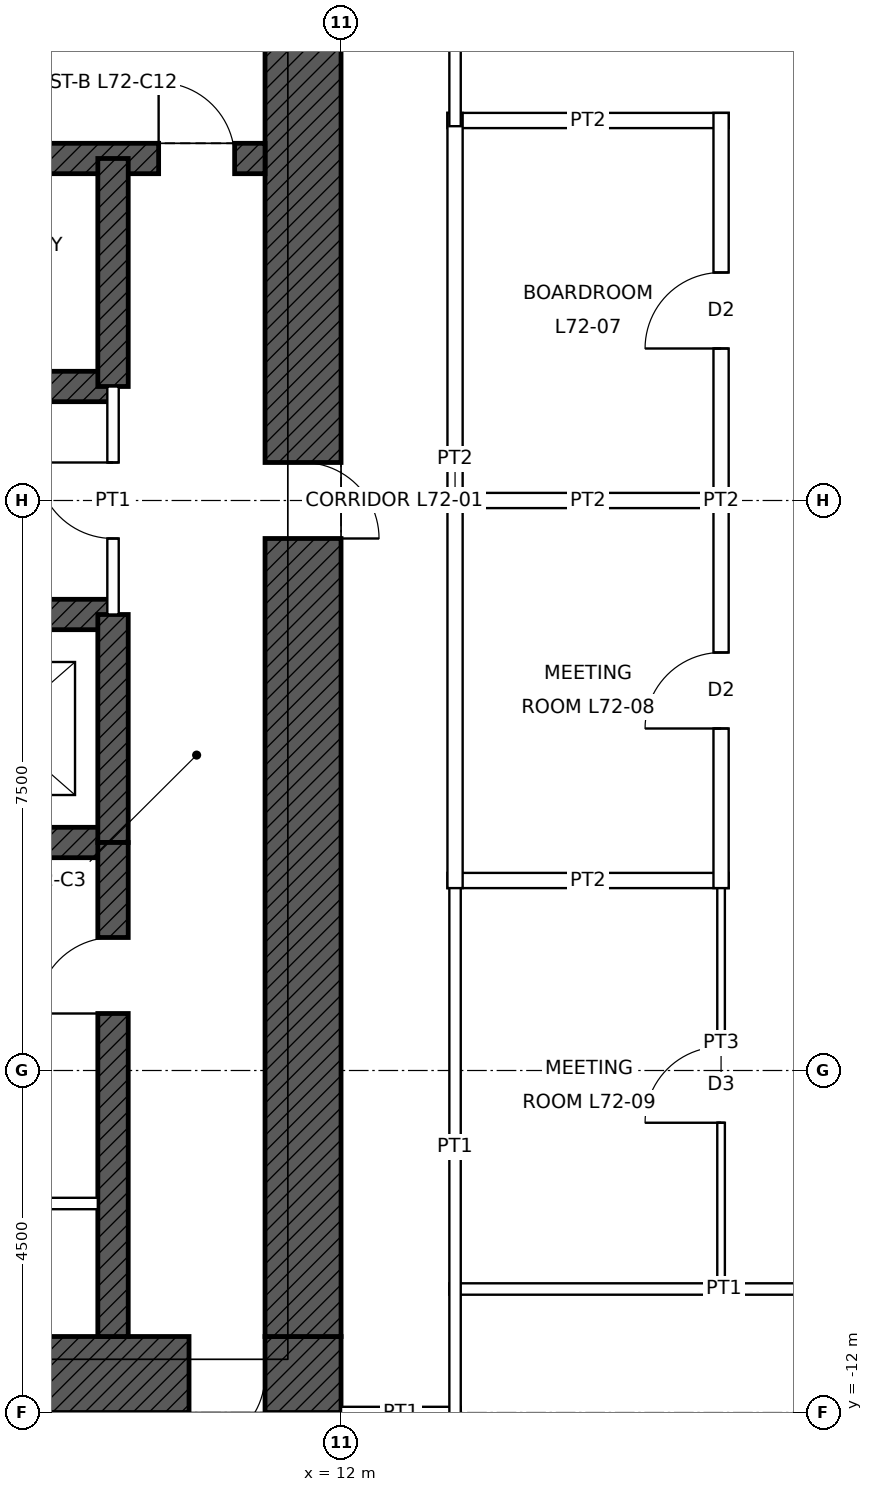
"""IFC4 building model, lengths in metres.
Left out: names, types, materials, properties, quantities, classifications, styles, units other than length and angle.
Written with IfcOpenShell. Run it as: python <this file> out.ifc"""

import sys

from ifc_helpers import new_model, si_unit, direction, frame, frame_2d, origin, place, context, subcontext, project, spatial, rectangle, extrude, element, fill, save


model = new_model("IFC4")
c1 = context("Model", 3, precision=1e-05, world=origin(), true_north=direction((0.0, 1.0)))
c2 = subcontext(c1, "Body", "Model", "MODEL_VIEW")
j1 = project(units=[si_unit("LENGTHUNIT", "METRE"), si_unit("PLANEANGLEUNIT", "RADIAN")], contexts=[c1])
p1 = place(None, origin())
s1 = spatial("IfcSite", under=j1, at=p1, CompositionType="ELEMENT")
p2 = place(p1, origin())
s2 = spatial("IfcBuilding", under=s1, at=p2, CompositionType="ELEMENT")
p3 = place(p2, frame((0.0, 0.0, 323.9)))
s3 = spatial("IfcBuildingStorey", under=s2, at=p3, CompositionType="ELEMENT", Elevation=323.9)
p4 = place(p3, frame((12.0, -11.5, 0.0), z_axis=(0.0, 0.0, 1.0), x_axis=(-1.0, 0.0, 0.0)))
e1 = element("IfcWall", 1, at=p4, inside=s3, PredefinedType="SHEAR", context=c2, shape_type="SweptSolid", body=[
    extrude(rectangle(XDim=24.0, YDim=1.0, at=frame_2d((12.0, 0.0))), origin(), (0.0, 0.0, 1.0), 4.0),
])
p5 = place(p4, frame((11.5, 0.0, 0.0)))
e2 = element("IfcOpeningElement", 2, at=p5, cuts=e1, PredefinedType="OPENING", context=c2, shape_type="SweptSolid", body=[
    extrude(rectangle(XDim=1.0, YDim=2.1, at=frame_2d((0.5, 1.05))), frame((0.0, 0.51, 0.0), z_axis=(0.0, -1.0, 0.0), x_axis=(1.0, 0.0, 0.0)), (0.0, 0.0, 1.0), 1.02),
])
p6 = place(p4, frame((1.0, 0.0, 0.0)))
e3 = element("IfcOpeningElement", 3, at=p6, cuts=e1, PredefinedType="OPENING", context=c2, shape_type="SweptSolid", body=[
    extrude(rectangle(XDim=1.0, YDim=2.4, at=frame_2d((0.5, 1.2))), frame((0.0, 0.51, 0.0), z_axis=(0.0, -1.0, 0.0), x_axis=(1.0, 0.0, 0.0)), (0.0, 0.0, 1.0), 1.02),
])
p7 = place(p3, frame((11.5, 11.0, 0.0), z_axis=(0.0, 0.0, 1.0), x_axis=(0.0, -1.0, 0.0)))
e4 = element("IfcWall", 4, at=p7, inside=s3, PredefinedType="SHEAR", context=c2, shape_type="SweptSolid", body=[
    extrude(rectangle(XDim=22.0, YDim=1.0, at=frame_2d((11.0, 0.0))), origin(), (0.0, 0.0, 1.0), 4.0),
])
p8 = place(p7, frame((10.5, 0.0, 0.0)))
e5 = element("IfcOpeningElement", 5, at=p8, cuts=e4, PredefinedType="OPENING", context=c2, shape_type="SweptSolid", body=[
    extrude(rectangle(XDim=1.0, YDim=2.4, at=frame_2d((0.5, 1.2))), frame((0.0, 0.51, 0.0), z_axis=(0.0, -1.0, 0.0), x_axis=(1.0, 0.0, 0.0)), (0.0, 0.0, 1.0), 1.02),
])
p9 = place(p3, frame((-11.0, 4.5, 0.0), z_axis=(0.0, 0.0, 1.0), x_axis=(1.0, 0.0, 0.0)))
e6 = element("IfcWall", 6, at=p9, inside=s3, PredefinedType="SHEAR", context=c2, shape_type="SweptSolid", body=[
    extrude(rectangle(XDim=22.0, YDim=0.4, at=frame_2d((11.0, 0.0))), origin(), (0.0, 0.0, 1.0), 4.0),
])
p10 = place(p9, frame((0.4, 0.0, 0.0)))
e7 = element("IfcOpeningElement", 7, at=p10, cuts=e6, PredefinedType="OPENING", context=c2, shape_type="SweptSolid", body=[
    extrude(rectangle(XDim=1.0, YDim=2.1, at=frame_2d((0.5, 1.05))), frame((0.0, 0.21, 0.0), z_axis=(0.0, -1.0, 0.0), x_axis=(1.0, 0.0, 0.0)), (0.0, 0.0, 1.0), 0.42),
])
p11 = place(p9, frame((20.6, 0.0, 0.0)))
e8 = element("IfcOpeningElement", 8, at=p11, cuts=e6, PredefinedType="OPENING", context=c2, shape_type="SweptSolid", body=[
    extrude(rectangle(XDim=1.0, YDim=2.1, at=frame_2d((0.5, 1.05))), frame((0.0, 0.21, 0.0), z_axis=(0.0, -1.0, 0.0), x_axis=(1.0, 0.0, 0.0)), (0.0, 0.0, 1.0), 0.42),
])
p12 = place(p3, frame((-9.0, 1.5, 0.0), z_axis=(0.0, 0.0, 1.0), x_axis=(1.0, 0.0, 0.0)))
e9 = element("IfcWall", 9, at=p12, inside=s3, PredefinedType="SHEAR", context=c2, shape_type="SweptSolid", body=[
    extrude(rectangle(XDim=18.0, YDim=0.4, at=frame_2d((9.0, 0.0))), origin(), (0.0, 0.0, 1.0), 4.0),
])
p13 = place(p12, frame((0.95, 0.0, 0.0)))
e10 = element("IfcOpeningElement", 10, at=p13, cuts=e9, PredefinedType="OPENING", context=c2, shape_type="SweptSolid", body=[
    extrude(rectangle(XDim=1.1, YDim=2.1, at=frame_2d((0.55, 1.05))), frame((0.0, 0.21, 0.0), z_axis=(0.0, -1.0, 0.0), x_axis=(1.0, 0.0, 0.0)), (0.0, 0.0, 1.0), 0.42),
])
p14 = place(p12, frame((3.95, 0.0, 0.0)))
e11 = element("IfcOpeningElement", 11, at=p14, cuts=e9, PredefinedType="OPENING", context=c2, shape_type="SweptSolid", body=[
    extrude(rectangle(XDim=1.1, YDim=2.1, at=frame_2d((0.55, 1.05))), frame((0.0, 0.21, 0.0), z_axis=(0.0, -1.0, 0.0), x_axis=(1.0, 0.0, 0.0)), (0.0, 0.0, 1.0), 0.42),
])
p15 = place(p12, frame((6.95, 0.0, 0.0)))
e12 = element("IfcOpeningElement", 12, at=p15, cuts=e9, PredefinedType="OPENING", context=c2, shape_type="SweptSolid", body=[
    extrude(rectangle(XDim=1.1, YDim=2.1, at=frame_2d((0.55, 1.05))), frame((0.0, 0.21, 0.0), z_axis=(0.0, -1.0, 0.0), x_axis=(1.0, 0.0, 0.0)), (0.0, 0.0, 1.0), 0.42),
])
p16 = place(p12, frame((9.95, 0.0, 0.0)))
e13 = element("IfcOpeningElement", 13, at=p16, cuts=e9, PredefinedType="OPENING", context=c2, shape_type="SweptSolid", body=[
    extrude(rectangle(XDim=1.1, YDim=2.1, at=frame_2d((0.55, 1.05))), frame((0.0, 0.21, 0.0), z_axis=(0.0, -1.0, 0.0), x_axis=(1.0, 0.0, 0.0)), (0.0, 0.0, 1.0), 0.42),
])
p17 = place(p12, frame((12.95, 0.0, 0.0)))
e14 = element("IfcOpeningElement", 14, at=p17, cuts=e9, PredefinedType="OPENING", context=c2, shape_type="SweptSolid", body=[
    extrude(rectangle(XDim=1.1, YDim=2.1, at=frame_2d((0.55, 1.05))), frame((0.0, 0.21, 0.0), z_axis=(0.0, -1.0, 0.0), x_axis=(1.0, 0.0, 0.0)), (0.0, 0.0, 1.0), 0.42),
])
p18 = place(p12, frame((15.95, 0.0, 0.0)))
e15 = element("IfcOpeningElement", 15, at=p18, cuts=e9, PredefinedType="OPENING", context=c2, shape_type="SweptSolid", body=[
    extrude(rectangle(XDim=1.1, YDim=2.1, at=frame_2d((0.55, 1.05))), frame((0.0, 0.21, 0.0), z_axis=(0.0, -1.0, 0.0), x_axis=(1.0, 0.0, 0.0)), (0.0, 0.0, 1.0), 0.42),
])
p19 = place(p3, frame((-9.0, -1.5, 0.0), z_axis=(0.0, 0.0, 1.0), x_axis=(1.0, 0.0, 0.0)))
e16 = element("IfcWall", 16, at=p19, inside=s3, PredefinedType="SHEAR", context=c2, shape_type="SweptSolid", body=[
    extrude(rectangle(XDim=18.0, YDim=0.4, at=frame_2d((9.0, 0.0))), origin(), (0.0, 0.0, 1.0), 4.0),
])
p20 = place(p19, frame((9.95, 0.0, 0.0)))
e17 = element("IfcOpeningElement", 17, at=p20, cuts=e16, PredefinedType="OPENING", context=c2, shape_type="SweptSolid", body=[
    extrude(rectangle(XDim=1.1, YDim=2.1, at=frame_2d((0.55, 1.05))), frame((0.0, 0.21, 0.0), z_axis=(0.0, -1.0, 0.0), x_axis=(1.0, 0.0, 0.0)), (0.0, 0.0, 1.0), 0.42),
])
p21 = place(p19, frame((12.95, 0.0, 0.0)))
e18 = element("IfcOpeningElement", 18, at=p21, cuts=e16, PredefinedType="OPENING", context=c2, shape_type="SweptSolid", body=[
    extrude(rectangle(XDim=1.1, YDim=2.1, at=frame_2d((0.55, 1.05))), frame((0.0, 0.21, 0.0), z_axis=(0.0, -1.0, 0.0), x_axis=(1.0, 0.0, 0.0)), (0.0, 0.0, 1.0), 0.42),
])
p22 = place(p19, frame((15.95, 0.0, 0.0)))
e19 = element("IfcOpeningElement", 19, at=p22, cuts=e16, PredefinedType="OPENING", context=c2, shape_type="SweptSolid", body=[
    extrude(rectangle(XDim=1.1, YDim=2.1, at=frame_2d((0.55, 1.05))), frame((0.0, 0.21, 0.0), z_axis=(0.0, -1.0, 0.0), x_axis=(1.0, 0.0, 0.0)), (0.0, 0.0, 1.0), 0.42),
])
p23 = place(p19, frame((0.95, 0.0, 0.0)))
e20 = element("IfcOpeningElement", 20, at=p23, cuts=e16, PredefinedType="OPENING", context=c2, shape_type="SweptSolid", body=[
    extrude(rectangle(XDim=1.1, YDim=2.1, at=frame_2d((0.55, 1.05))), frame((0.0, 0.21, 0.0), z_axis=(0.0, -1.0, 0.0), x_axis=(1.0, 0.0, 0.0)), (0.0, 0.0, 1.0), 0.42),
])
p24 = place(p19, frame((3.95, 0.0, 0.0)))
e21 = element("IfcOpeningElement", 21, at=p24, cuts=e16, PredefinedType="OPENING", context=c2, shape_type="SweptSolid", body=[
    extrude(rectangle(XDim=1.1, YDim=2.1, at=frame_2d((0.55, 1.05))), frame((0.0, 0.21, 0.0), z_axis=(0.0, -1.0, 0.0), x_axis=(1.0, 0.0, 0.0)), (0.0, 0.0, 1.0), 0.42),
])
p25 = place(p19, frame((6.95, 0.0, 0.0)))
e22 = element("IfcOpeningElement", 22, at=p25, cuts=e16, PredefinedType="OPENING", context=c2, shape_type="SweptSolid", body=[
    extrude(rectangle(XDim=1.1, YDim=2.1, at=frame_2d((0.55, 1.05))), frame((0.0, 0.21, 0.0), z_axis=(0.0, -1.0, 0.0), x_axis=(1.0, 0.0, 0.0)), (0.0, 0.0, 1.0), 0.42),
])
p26 = place(p3, frame((-9.0, -4.5, 0.0), z_axis=(0.0, 0.0, 1.0), x_axis=(1.0, 0.0, 0.0)))
e23 = element("IfcWall", 23, at=p26, inside=s3, PredefinedType="SHEAR", context=c2, shape_type="SweptSolid", body=[
    extrude(rectangle(XDim=18.0, YDim=0.4, at=frame_2d((9.0, 0.0))), origin(), (0.0, 0.0, 1.0), 4.0),
])
for number, where, z_axis, x_axis in (
    (24, (9.0, 1.5, 0.0), (0.0, 0.0, 1.0), (0.0, 1.0, 0.0)),
    (25, (9.0, -4.5, 0.0), (0.0, 0.0, 1.0), (0.0, 1.0, 0.0)),
):
    element("IfcWall", number, at=place(p3, frame(where, z_axis=z_axis, x_axis=x_axis)), inside=s3, PredefinedType="SHEAR", context=c2, shape_type="SweptSolid", body=[
        extrude(rectangle(XDim=3.0, YDim=0.4, at=frame_2d((1.5, 0.0))), origin(), (0.0, 0.0, 1.0), 4.0),
    ])
p27 = place(p3, frame((9.0, -11.0, 0.0), z_axis=(0.0, 0.0, 1.0), x_axis=(0.0, 1.0, 0.0)))
e26 = element("IfcWall", 26, at=p27, inside=s3, PredefinedType="SHEAR", context=c2, shape_type="SweptSolid", body=[
    extrude(rectangle(XDim=6.5, YDim=0.4, at=frame_2d((3.25, 0.0))), origin(), (0.0, 0.0, 1.0), 4.0),
])
p28 = place(p27, frame((4.25, 0.0, 0.0)))
e27 = element("IfcOpeningElement", 27, at=p28, cuts=e26, PredefinedType="OPENING", context=c2, shape_type="SweptSolid", body=[
    extrude(rectangle(XDim=1.0, YDim=2.1, at=frame_2d((0.5, 1.05))), frame((0.0, 0.21, 0.0), z_axis=(0.0, -1.0, 0.0), x_axis=(1.0, 0.0, 0.0)), (0.0, 0.0, 1.0), 0.42),
])
p29 = place(p3, frame((12.0, -12.0, 0.0), z_axis=(0.0, 0.0, 1.0), x_axis=(1.0, 0.0, 0.0)))
e28 = element("IfcWall", 28, at=p29, inside=s3, PredefinedType="PARTITIONING", context=c2, shape_type="SweptSolid", body=[
    extrude(rectangle(XDim=1.575, YDim=0.15, at=frame_2d((0.788, 0.0))), origin(), (0.0, 0.0, 1.0), 3.85),
])
p30 = place(p3, frame((13.425, -10.375, 0.0), z_axis=(0.0, 0.0, 1.0), x_axis=(1.0, 0.0, 0.0)))
e29 = element("IfcWall", 29, at=p30, inside=s3, PredefinedType="PARTITIONING", context=c2, shape_type="SweptSolid", body=[
    extrude(rectangle(XDim=7.225, YDim=0.15, at=frame_2d((3.612, 0.0))), origin(), (0.0, 0.0, 1.0), 3.85),
])
p31 = place(p3, frame((13.4, -5.0, 0.0), z_axis=(0.0, 0.0, 1.0), x_axis=(1.0, 0.0, 0.0)))
e30 = element("IfcWall", 30, at=p31, inside=s3, PredefinedType="PARTITIONING", context=c2, shape_type="SweptSolid", body=[
    extrude(rectangle(XDim=3.7, YDim=0.2, at=frame_2d((1.85, 0.0))), origin(), (0.0, 0.0, 1.0), 3.85),
])
p32 = place(p3, frame((13.4, 0.0, 0.0), z_axis=(0.0, 0.0, 1.0), x_axis=(1.0, 0.0, 0.0)))
e31 = element("IfcWall", 31, at=p32, inside=s3, PredefinedType="PARTITIONING", context=c2, shape_type="SweptSolid", body=[
    extrude(rectangle(XDim=3.7, YDim=0.2, at=frame_2d((1.85, 0.0))), origin(), (0.0, 0.0, 1.0), 3.243),
])
p33 = place(p3, frame((13.4, 5.0, 0.0), z_axis=(0.0, 0.0, 1.0), x_axis=(1.0, 0.0, 0.0)))
e32 = element("IfcWall", 32, at=p33, inside=s3, PredefinedType="PARTITIONING", context=c2, shape_type="SweptSolid", body=[
    extrude(rectangle(XDim=3.7, YDim=0.2, at=frame_2d((1.85, 0.0))), origin(), (0.0, 0.0, 1.0), 3.85),
])
p34 = place(p3, frame((13.5, -12.075, 0.0), z_axis=(0.0, 0.0, 1.0), x_axis=(0.0, 1.0, 0.0)))
e33 = element("IfcWall", 33, at=p34, inside=s3, PredefinedType="PARTITIONING", context=c2, shape_type="SweptSolid", body=[
    extrude(rectangle(XDim=7.15, YDim=0.15, at=frame_2d((3.575, 0.0))), origin(), (0.0, 0.0, 1.0), 3.85),
])
p35 = place(p3, frame((13.5, -5.1, 0.0), z_axis=(0.0, 0.0, 1.0), x_axis=(0.0, 1.0, 0.0)))
e34 = element("IfcWall", 34, at=p35, inside=s3, PredefinedType="PARTITIONING", context=c2, shape_type="SweptSolid", body=[
    extrude(rectangle(XDim=10.2, YDim=0.2, at=frame_2d((5.1, 0.0))), origin(), (0.0, 0.0, 1.0), 3.85),
])
p36 = place(p3, frame((13.5, 4.925, 0.0), z_axis=(0.0, 0.0, 1.0), x_axis=(0.0, 1.0, 0.0)))
e35 = element("IfcWall", 35, at=p36, inside=s3, PredefinedType="PARTITIONING", context=c2, shape_type="SweptSolid", body=[
    extrude(rectangle(XDim=8.65, YDim=0.15, at=frame_2d((4.325, 0.0))), origin(), (0.0, 0.0, 1.0), 3.85),
])
p37 = place(p36, frame((3.825, 0.0, 0.0)))
e36 = element("IfcOpeningElement", 36, at=p37, cuts=e35, PredefinedType="OPENING", context=c2, shape_type="SweptSolid", body=[
    extrude(rectangle(XDim=1.0, YDim=2.4, at=frame_2d((0.5, 1.2))), frame((0.0, 0.085, 0.0), z_axis=(0.0, -1.0, 0.0), x_axis=(1.0, 0.0, 0.0)), (0.0, 0.0, 1.0), 0.17),
])
p38 = place(p3, frame((17.0, -10.425, 0.0), z_axis=(0.0, 0.0, 1.0), x_axis=(0.0, 1.0, 0.0)))
e37 = element("IfcWall", 37, at=p38, inside=s3, PredefinedType="PARTITIONING", context=c2, shape_type="SweptSolid", body=[
    extrude(rectangle(XDim=5.475, YDim=0.1, at=frame_2d((2.738, 0.0))), origin(), (0.0, 0.0, 1.0), 3.85),
])
p39 = place(p38, frame((2.238, 0.0, 0.0)))
e38 = element("IfcOpeningElement", 38, at=p39, cuts=e37, PredefinedType="OPENING", context=c2, shape_type="SweptSolid", body=[
    extrude(rectangle(XDim=1.0, YDim=2.1, at=frame_2d((0.5, 1.05))), frame((0.0, 0.06, 0.0), z_axis=(0.0, -1.0, 0.0), x_axis=(1.0, 0.0, 0.0)), (0.0, 0.0, 1.0), 0.12),
])
p40 = place(p3, frame((17.0, -5.1, 0.0), z_axis=(0.0, 0.0, 1.0), x_axis=(0.0, 1.0, 0.0)))
e39 = element("IfcWall", 39, at=p40, inside=s3, PredefinedType="PARTITIONING", context=c2, shape_type="SweptSolid", body=[
    extrude(rectangle(XDim=10.2, YDim=0.2, at=frame_2d((5.1, 0.0))), origin(), (0.0, 0.0, 1.0), 3.85),
])
p41 = place(p40, frame((7.1, 0.0, 0.0)))
e40 = element("IfcOpeningElement", 40, at=p41, cuts=e39, PredefinedType="OPENING", context=c2, shape_type="SweptSolid", body=[
    extrude(rectangle(XDim=1.0, YDim=2.1, at=frame_2d((0.5, 1.05))), frame((0.0, 0.11, 0.0), z_axis=(0.0, -1.0, 0.0), x_axis=(1.0, 0.0, 0.0)), (0.0, 0.0, 1.0), 0.22),
])
p42 = place(p40, frame((2.1, 0.0, 0.0)))
e41 = element("IfcOpeningElement", 41, at=p42, cuts=e39, PredefinedType="OPENING", context=c2, shape_type="SweptSolid", body=[
    extrude(rectangle(XDim=1.0, YDim=2.1, at=frame_2d((0.5, 1.05))), frame((0.0, 0.11, 0.0), z_axis=(0.0, -1.0, 0.0), x_axis=(1.0, 0.0, 0.0)), (0.0, 0.0, 1.0), 0.22),
])
p43 = place(p3, frame((3.2, -9.25, 0.0), z_axis=(0.0, 0.0, 1.0), x_axis=(1.0, 0.0, 0.0)))
e42 = element("IfcWall", 42, at=p43, inside=s3, PredefinedType="PARTITIONING", context=c2, shape_type="SweptSolid", body=[
    extrude(rectangle(XDim=5.6, YDim=0.15, at=frame_2d((2.8, 0.0))), origin(), (0.0, 0.0, 1.0), 3.75),
])
p44 = place(p43, frame((2.3, 0.0, 0.0)))
e43 = element("IfcOpeningElement", 43, at=p44, cuts=e42, PredefinedType="OPENING", context=c2, shape_type="SweptSolid", body=[
    extrude(rectangle(XDim=1.0, YDim=2.1, at=frame_2d((0.5, 1.05))), frame((0.0, 0.085, 0.0), z_axis=(0.0, -1.0, 0.0), x_axis=(1.0, 0.0, 0.0)), (0.0, 0.0, 1.0), 0.17),
])
p45 = place(p3, frame((9.0, -1.5, 0.0), z_axis=(0.0, 0.0, 1.0), x_axis=(0.0, 1.0, 0.0)))
e44 = element("IfcWall", 44, at=p45, inside=s3, PredefinedType="PARTITIONING", context=c2, shape_type="SweptSolid", body=[
    extrude(rectangle(XDim=3.0, YDim=0.15, at=frame_2d((1.5, 0.0))), origin(), (0.0, 0.0, 1.0), 3.75),
])
p46 = place(p45, frame((1.0, 0.0, 0.0)))
e45 = element("IfcOpeningElement", 45, at=p46, cuts=e44, PredefinedType="OPENING", context=c2, shape_type="SweptSolid", body=[
    extrude(rectangle(XDim=1.0, YDim=2.4, at=frame_2d((0.5, 1.2))), frame((0.0, 0.085, 0.0), z_axis=(0.0, -1.0, 0.0), x_axis=(1.0, 0.0, 0.0)), (0.0, 0.0, 1.0), 0.17),
])
p47 = place(p11, origin())
e46 = element("IfcDoor", 46, at=p47, inside=s3, OperationType="SINGLE_SWING_LEFT", PredefinedType="DOOR", context=c2, shape_type="SweptSolid", body=[
    extrude(rectangle(XDim=1.0, YDim=2.1, at=frame_2d((0.5, 1.05))), frame((0.0, 0.025, 0.0), z_axis=(0.0, -1.0, 0.0), x_axis=(1.0, 0.0, 0.0)), (0.0, 0.0, 1.0), 0.05),
])
fill(e8, e46)
p48 = place(p8, origin())
e47 = element("IfcDoor", 47, at=p48, inside=s3, OperationType="SINGLE_SWING_RIGHT", PredefinedType="DOOR", context=c2, shape_type="SweptSolid", body=[
    extrude(rectangle(XDim=1.0, YDim=2.4, at=frame_2d((0.5, 1.2))), frame((0.0, 0.485, 0.0), z_axis=(0.0, -1.0, 0.0), x_axis=(1.0, 0.0, 0.0)), (0.0, 0.0, 1.0), 0.05),
])
fill(e5, e47)
p49 = place(p6, origin())
e48 = element("IfcDoor", 48, at=p49, inside=s3, OperationType="SINGLE_SWING_RIGHT", PredefinedType="DOOR", context=c2, shape_type="SweptSolid", body=[
    extrude(rectangle(XDim=1.0, YDim=2.4, at=frame_2d((0.5, 1.2))), frame((0.0, 0.485, 0.0), z_axis=(0.0, -1.0, 0.0), x_axis=(1.0, 0.0, 0.0)), (0.0, 0.0, 1.0), 0.05),
])
fill(e3, e48)
p50 = place(p28, origin())
e49 = element("IfcDoor", 49, at=p50, inside=s3, OperationType="SINGLE_SWING_LEFT", PredefinedType="DOOR", context=c2, shape_type="SweptSolid", body=[
    extrude(rectangle(XDim=1.0, YDim=2.1, at=frame_2d((0.5, 1.05))), frame((0.0, 0.025, 0.0), z_axis=(0.0, -1.0, 0.0), x_axis=(1.0, 0.0, 0.0)), (0.0, 0.0, 1.0), 0.05),
])
fill(e27, e49)
p51 = place(p46, origin())
e50 = element("IfcDoor", 50, at=p51, inside=s3, OperationType="SINGLE_SWING_RIGHT", PredefinedType="DOOR", context=c2, shape_type="SweptSolid", body=[
    extrude(rectangle(XDim=1.0, YDim=2.4, at=frame_2d((0.5, 1.2))), frame((0.0, 0.025, 0.0), z_axis=(0.0, -1.0, 0.0), x_axis=(1.0, 0.0, 0.0)), (0.0, 0.0, 1.0), 0.05),
])
fill(e45, e50)
p52 = place(p41, origin())
e51 = element("IfcDoor", 51, at=p52, inside=s3, OperationType="SINGLE_SWING_LEFT", PredefinedType="DOOR", context=c2, shape_type="SweptSolid", body=[
    extrude(rectangle(XDim=1.0, YDim=2.1, at=frame_2d((0.5, 1.05))), frame((0.0, 0.025, 0.0), z_axis=(0.0, -1.0, 0.0), x_axis=(1.0, 0.0, 0.0)), (0.0, 0.0, 1.0), 0.05),
])
fill(e40, e51)
p53 = place(p42, origin())
e52 = element("IfcDoor", 52, at=p53, inside=s3, OperationType="SINGLE_SWING_LEFT", PredefinedType="DOOR", context=c2, shape_type="SweptSolid", body=[
    extrude(rectangle(XDim=1.0, YDim=2.1, at=frame_2d((0.5, 1.05))), frame((0.0, 0.025, 0.0), z_axis=(0.0, -1.0, 0.0), x_axis=(1.0, 0.0, 0.0)), (0.0, 0.0, 1.0), 0.05),
])
fill(e41, e52)
p54 = place(p39, origin())
e53 = element("IfcDoor", 53, at=p54, inside=s3, OperationType="SINGLE_SWING_LEFT", PredefinedType="DOOR", context=c2, shape_type="SweptSolid", body=[
    extrude(rectangle(XDim=1.0, YDim=2.1, at=frame_2d((0.5, 1.05))), frame((0.0, 0.025, 0.0), z_axis=(0.0, -1.0, 0.0), x_axis=(1.0, 0.0, 0.0)), (0.0, 0.0, 1.0), 0.05),
])
fill(e38, e53)
save(model, sys.argv[1])
